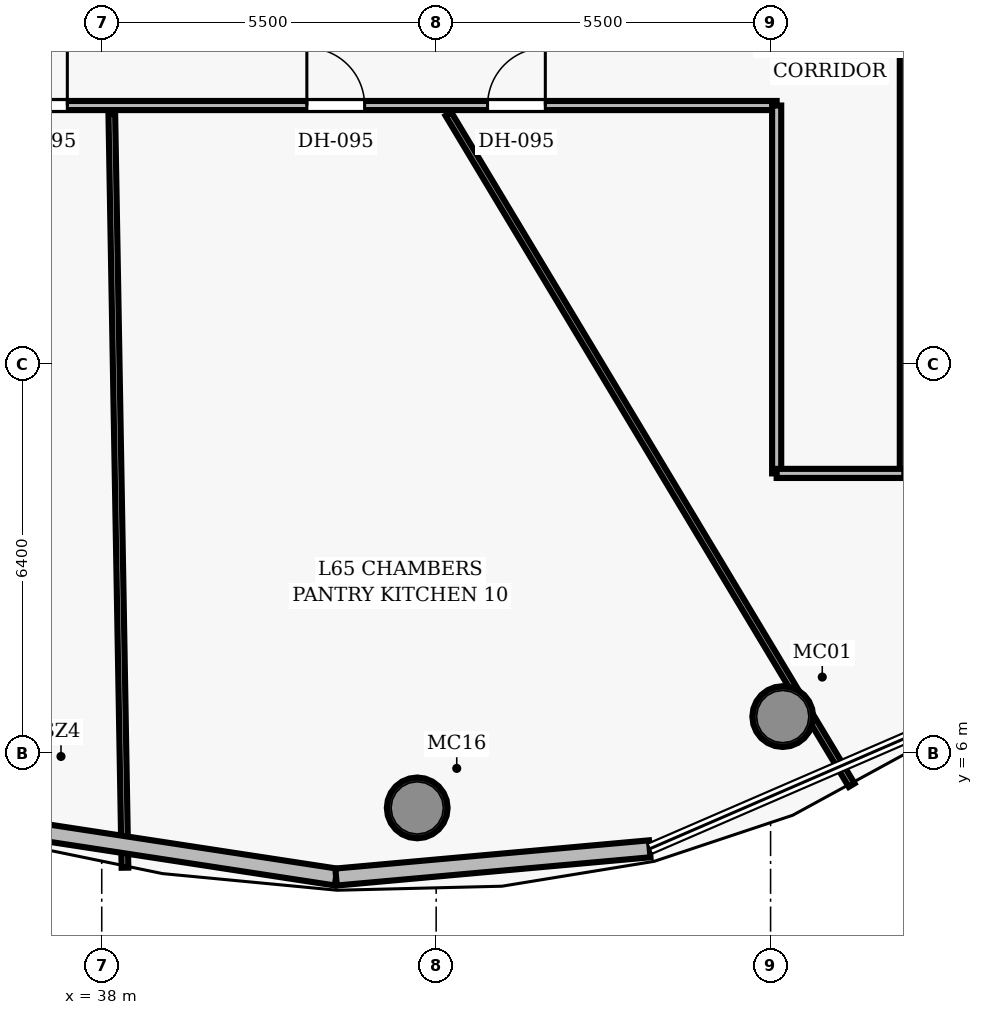
"""IFC4 building model, lengths in metres.
Left out: names, types, materials, properties, quantities, classifications, styles, units other than length and angle.
Written with IfcOpenShell. Run it as: python <this file> out.ifc"""

import sys

from ifc_helpers import new_model, si_unit, direction, frame, frame_2d, origin, origin_2d, place, context, subcontext, project, spatial, rectangle, hollow_circle, extrude, element, fill, save


model = new_model("IFC4")
c1 = context("Model", 3, precision=1e-05, world=origin(), true_north=direction((0.0, 1.0)))
c2 = subcontext(c1, "Body", "Model", "MODEL_VIEW")
j1 = project(units=[si_unit("LENGTHUNIT", "METRE"), si_unit("PLANEANGLEUNIT", "RADIAN")], contexts=[c1])
p1 = place(None, origin())
s1 = spatial("IfcSite", under=j1, at=p1, CompositionType="ELEMENT")
p2 = place(p1, origin())
s2 = spatial("IfcBuilding", under=s1, at=p2, CompositionType="ELEMENT")
p3 = place(p2, frame((0.0, 0.0, 257.45)))
s3 = spatial("IfcBuildingStorey", under=s2, at=p3, CompositionType="ELEMENT", Elevation=257.45)
for number, where, z_axis, x_axis in (
    (1, (49.2, 6.601, 0.0), (0.0, 0.0, 1.0), (1.0, 0.0, 0.0)),
    (2, (43.188, 5.099, 0.0), (0.0, 0.0, 1.0), (1.0, 0.0, 0.0)),
):
    element("IfcColumn", number, at=place(p3, frame(where, z_axis=z_axis, x_axis=x_axis)), inside=s3, PredefinedType="COLUMN", context=c2, shape_type="SweptSolid", body=[
        extrude(hollow_circle(Radius=0.5, WallThickness=0.045, at=origin_2d()), origin(), (0.0, 0.0, 1.0), 3.85),
    ])
p4 = place(p3, frame((26.9, 16.65, 0.0), z_axis=(0.0, 0.0, 1.0), x_axis=(1.0, 0.0, 0.0)))
e3 = element("IfcWall", 3, at=p4, inside=s3, PredefinedType="PARTITIONING", context=c2, shape_type="SweptSolid", body=[
    extrude(rectangle(XDim=22.2, YDim=0.15, at=frame_2d((11.1, 0.0))), origin(), (0.0, 0.0, 1.0), 3.04),
])
p5 = place(p4, frame((4.135, 0.0, 0.0)))
e4 = element("IfcOpeningElement", 4, at=p5, cuts=e3, PredefinedType="OPENING", context=c2, shape_type="SweptSolid", body=[
    extrude(rectangle(XDim=0.95, YDim=2.15, at=frame_2d((0.475, 1.075))), frame((0.0, 0.085, 0.0), z_axis=(0.0, -1.0, 0.0), x_axis=(1.0, 0.0, 0.0)), (0.0, 0.0, 1.0), 0.17),
])
p6 = place(p4, frame((9.584, 0.0, 0.0)))
e5 = element("IfcOpeningElement", 5, at=p6, cuts=e3, PredefinedType="OPENING", context=c2, shape_type="SweptSolid", body=[
    extrude(rectangle(XDim=0.95, YDim=2.15, at=frame_2d((0.475, 1.075))), frame((0.0, 0.085, 0.0), z_axis=(0.0, -1.0, 0.0), x_axis=(1.0, 0.0, 0.0)), (0.0, 0.0, 1.0), 0.17),
])
p7 = place(p4, frame((14.473, 0.0, 0.0)))
e6 = element("IfcOpeningElement", 6, at=p7, cuts=e3, PredefinedType="OPENING", context=c2, shape_type="SweptSolid", body=[
    extrude(rectangle(XDim=0.95, YDim=2.15, at=frame_2d((0.475, 1.075))), frame((0.0, 0.085, 0.0), z_axis=(0.0, -1.0, 0.0), x_axis=(1.0, 0.0, 0.0)), (0.0, 0.0, 1.0), 0.17),
])
p8 = place(p4, frame((17.445, 0.0, 0.0)))
e7 = element("IfcOpeningElement", 7, at=p8, cuts=e3, PredefinedType="OPENING", context=c2, shape_type="SweptSolid", body=[
    extrude(rectangle(XDim=0.95, YDim=2.15, at=frame_2d((0.475, 1.075))), frame((0.0, 0.085, 0.0), z_axis=(0.0, -1.0, 0.0), x_axis=(1.0, 0.0, 0.0)), (0.0, 0.0, 1.0), 0.17),
])
p9 = place(p3, frame((51.2, 10.6, 0.0), z_axis=(0.0, 0.0, 1.0), x_axis=(0.0, 1.0, 0.0)))
e8 = element("IfcWall", 8, at=p9, inside=s3, PredefinedType="PARTITIONING", context=c2, shape_type="SweptSolid", body=[
    extrude(rectangle(XDim=30.8, YDim=0.15, at=frame_2d((15.4, 0.0))), origin(), (0.0, 0.0, 1.0), 3.04),
])
p10 = place(p9, frame((17.79, 0.0, 0.0)))
e9 = element("IfcOpeningElement", 9, at=p10, cuts=e8, PredefinedType="OPENING", context=c2, shape_type="SweptSolid", body=[
    extrude(rectangle(XDim=0.95, YDim=2.15, at=frame_2d((0.475, 1.075))), frame((0.0, 0.085, 0.0), z_axis=(0.0, -1.0, 0.0), x_axis=(1.0, 0.0, 0.0)), (0.0, 0.0, 1.0), 0.17),
])
p11 = place(p9, frame((11.348, 0.0, 0.0)))
e10 = element("IfcOpeningElement", 10, at=p11, cuts=e8, PredefinedType="OPENING", context=c2, shape_type="SweptSolid", body=[
    extrude(rectangle(XDim=0.95, YDim=2.15, at=frame_2d((0.475, 1.075))), frame((0.0, 0.085, 0.0), z_axis=(0.0, -1.0, 0.0), x_axis=(1.0, 0.0, 0.0)), (0.0, 0.0, 1.0), 0.17),
])
p12 = place(p3, frame((49.1, 10.6, 0.0), z_axis=(0.0, 0.0, 1.0), x_axis=(0.0, 1.0, 0.0)))
e11 = element("IfcWall", 11, at=p12, inside=s3, PredefinedType="PARTITIONING", context=c2, shape_type="SweptSolid", body=[
    extrude(rectangle(XDim=6.05, YDim=0.15, at=frame_2d((3.025, 0.0))), origin(), (0.0, 0.0, 1.0), 3.04),
])
p13 = place(p3, frame((49.1, 10.6, 0.0), z_axis=(0.0, 0.0, 1.0), x_axis=(1.0, 0.0, 0.0)))
e12 = element("IfcWall", 12, at=p13, inside=s3, PredefinedType="PARTITIONING", context=c2, shape_type="SweptSolid", body=[
    extrude(rectangle(XDim=2.1, YDim=0.15, at=frame_2d((1.05, 0.0))), origin(), (0.0, 0.0, 1.0), 3.04),
])
p14 = place(p3, frame((38.166, 16.51, 0.0), z_axis=(0.0, 0.0, 1.0), x_axis=(0.017469313604, -0.999847399898, 0.0)))
e13 = element("IfcWall", 13, at=p14, inside=s3, PredefinedType="PARTITIONING", context=c2, shape_type="SweptSolid", body=[
    extrude(rectangle(XDim=12.396, YDim=0.11, at=frame_2d((6.198, 0.0))), origin(), (0.0, 0.0, 1.0), 3.04),
])
p15 = place(p3, frame((43.702, 16.51, 0.0), z_axis=(0.0, 0.0, 1.0), x_axis=(0.515031037402, -0.857171529224, 0.0)))
e14 = element("IfcWall", 14, at=p15, inside=s3, PredefinedType="PARTITIONING", context=c2, shape_type="SweptSolid", body=[
    extrude(rectangle(XDim=12.876, YDim=0.11, at=frame_2d((6.438, 0.0))), origin(), (0.0, 0.0, 1.0), 3.04),
])
p16 = place(p3, frame((41.854, 3.962, 0.0), z_axis=(0.0, 0.0, 1.0), x_axis=(-0.988510956269, 0.151149228699, 0.0)))
e15 = element("IfcWall", 15, at=p16, inside=s3, PredefinedType="SOLIDWALL", context=c2, shape_type="SweptSolid", body=[
    extrude(rectangle(XDim=5.86, YDim=0.28, at=frame_2d((2.93, 0.0))), origin(), (0.0, 0.0, 1.0), 3.625),
])
p17 = place(p3, frame((47.012, 4.427, 0.0), z_axis=(0.0, 0.0, 1.0), x_axis=(-0.995972797436, -0.089655935478, 0.0)))
e16 = element("IfcWall", 16, at=p17, inside=s3, PredefinedType="SOLIDWALL", context=c2, shape_type="SweptSolid", body=[
    extrude(rectangle(XDim=5.179, YDim=0.28, at=frame_2d((2.59, 0.0))), origin(), (0.0, 0.0, 1.0), 3.625),
])
p18 = place(p6, origin())
e17 = element("IfcDoor", 17, at=p18, inside=s3, OperationType="SINGLE_SWING_RIGHT", PredefinedType="DOOR", context=c2, shape_type="SweptSolid", body=[
    extrude(rectangle(XDim=0.95, YDim=2.15, at=frame_2d((0.475, 1.075))), frame((0.0, 0.025, 0.0), z_axis=(0.0, -1.0, 0.0), x_axis=(1.0, 0.0, 0.0)), (0.0, 0.0, 1.0), 0.05),
])
fill(e5, e17)
p19 = place(p7, origin())
e18 = element("IfcDoor", 18, at=p19, inside=s3, OperationType="SINGLE_SWING_LEFT", PredefinedType="DOOR", context=c2, shape_type="SweptSolid", body=[
    extrude(rectangle(XDim=0.95, YDim=2.15, at=frame_2d((0.475, 1.075))), frame((0.0, 0.025, 0.0), z_axis=(0.0, -1.0, 0.0), x_axis=(1.0, 0.0, 0.0)), (0.0, 0.0, 1.0), 0.05),
])
fill(e6, e18)
p20 = place(p8, origin())
e19 = element("IfcDoor", 19, at=p20, inside=s3, OperationType="SINGLE_SWING_RIGHT", PredefinedType="DOOR", context=c2, shape_type="SweptSolid", body=[
    extrude(rectangle(XDim=0.95, YDim=2.15, at=frame_2d((0.475, 1.075))), frame((0.0, 0.025, 0.0), z_axis=(0.0, -1.0, 0.0), x_axis=(1.0, 0.0, 0.0)), (0.0, 0.0, 1.0), 0.05),
])
fill(e7, e19)
save(model, sys.argv[1])
